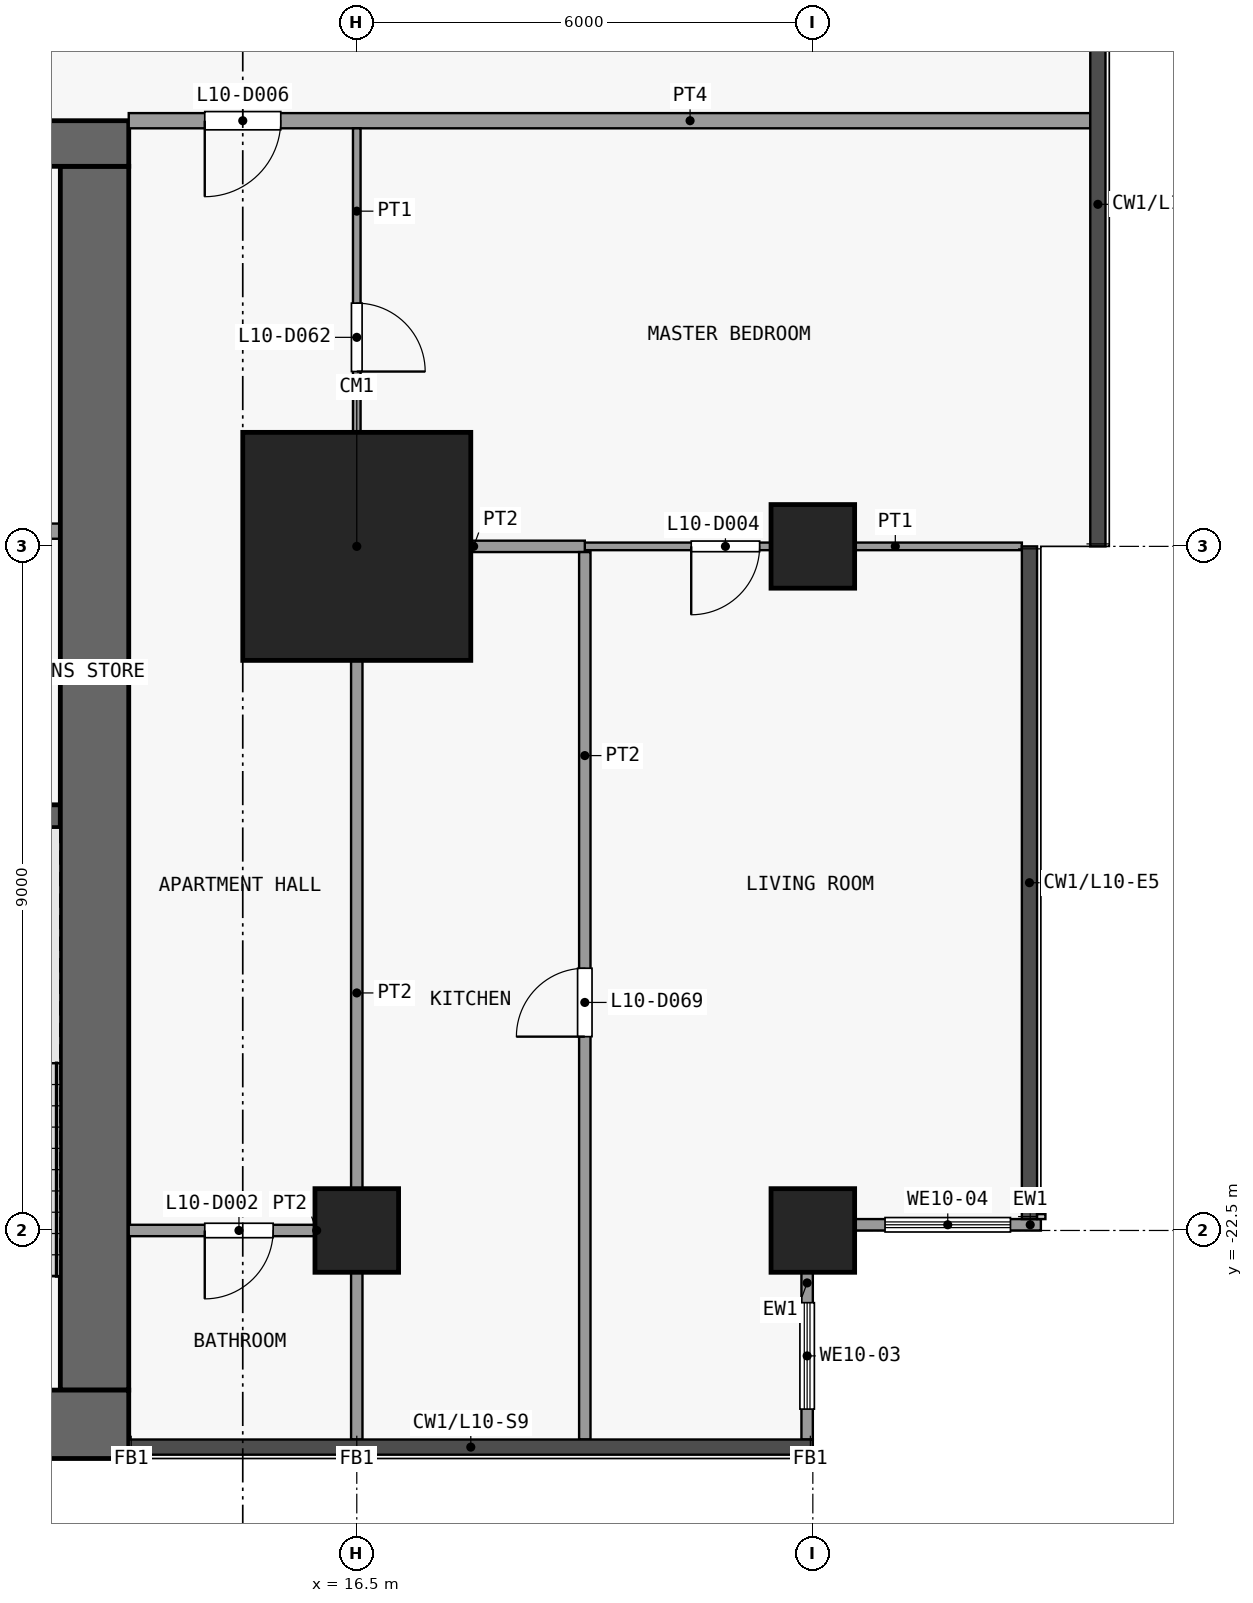
"""IFC4 building model, lengths in metres.
Left out: names, types, materials, properties, quantities, classifications, styles, units other than length and angle.
Written with IfcOpenShell. Run it as: python <this file> out.ifc"""

import sys

from ifc_helpers import new_model, si_unit, direction, frame, frame_2d, origin, origin_2d, place, context, subcontext, project, spatial, rectangle, extrude, element, fill, save


model = new_model("IFC4")
c1 = context("Model", 3, precision=1e-05, world=origin(), true_north=direction((0.0, 1.0)))
c2 = subcontext(c1, "Body", "Model", "MODEL_VIEW")
j1 = project(units=[si_unit("LENGTHUNIT", "METRE"), si_unit("PLANEANGLEUNIT", "RADIAN")], contexts=[c1])
p1 = place(None, origin())
s1 = spatial("IfcSite", under=j1, at=p1, CompositionType="ELEMENT")
p2 = place(p1, origin())
s2 = spatial("IfcBuilding", under=s1, at=p2, CompositionType="ELEMENT")
p3 = place(p2, frame((0.0, 0.0, 46.9)))
s3 = spatial("IfcBuildingStorey", under=s2, at=p3, CompositionType="ELEMENT", Elevation=46.9)
p4 = place(p3, frame((16.5, -22.5, 0.0), z_axis=(0.0, 0.0, 1.0), x_axis=(1.0, 0.0, 0.0)))
e1 = element("IfcColumn", 1, at=p4, inside=s3, PredefinedType="COLUMN", context=c2, shape_type="SweptSolid", body=[
    extrude(rectangle(XDim=1.1, YDim=1.1, at=origin_2d()), origin(), (0.0, 0.0, 1.0), 3.6),
])
p5 = place(p3, frame((16.5, -13.5, 0.0), z_axis=(0.0, 0.0, 1.0), x_axis=(1.0, 0.0, 0.0)))
e2 = element("IfcColumn", 2, at=p5, inside=s3, PredefinedType="COLUMN", context=c2, shape_type="SweptSolid", body=[
    extrude(rectangle(XDim=3.0, YDim=3.0, at=origin_2d()), origin(), (0.0, 0.0, 1.0), 3.6),
])
for number, where, z_axis, x_axis in (
    (3, (22.5, -22.5, 0.0), (0.0, 0.0, 1.0), (1.0, 0.0, 0.0)),
    (4, (22.5, -13.5, 0.0), (0.0, 0.0, 1.0), (1.0, 0.0, 0.0)),
):
    element("IfcColumn", number, at=place(p3, frame(where, z_axis=z_axis, x_axis=x_axis)), inside=s3, PredefinedType="COLUMN", context=c2, shape_type="SweptSolid", body=[
        extrude(rectangle(XDim=1.1, YDim=1.1, at=origin_2d()), origin(), (0.0, 0.0, 1.0), 3.6),
    ])
p6 = place(p3, frame((-13.5, -25.05, 0.0), z_axis=(0.0, 0.0, 1.0), x_axis=(1.0, 0.0, 0.0)))
e5 = element("IfcWall", 5, at=p6, inside=s3, PredefinedType="SHEAR", context=c2, shape_type="SweptSolid", body=[
    extrude(rectangle(XDim=27.0, YDim=0.9, at=frame_2d((13.5, 0.0))), origin(), (0.0, 0.0, 1.0), 3.3),
])
p7 = place(p3, frame((-13.5, -8.2, 0.0), z_axis=(0.0, 0.0, 1.0), x_axis=(1.0, 0.0, 0.0)))
e6 = element("IfcWall", 6, at=p7, inside=s3, PredefinedType="SHEAR", context=c2, shape_type="SweptSolid", body=[
    extrude(rectangle(XDim=27.0, YDim=0.6, at=frame_2d((13.5, 0.0))), origin(), (0.0, 0.0, 1.0), 3.3),
])
p8 = place(p7, frame((7.8, 0.0, 0.0)))
e7 = element("IfcOpeningElement", 7, at=p8, cuts=e6, PredefinedType="OPENING", context=c2, shape_type="SweptSolid", body=[
    extrude(rectangle(XDim=1.8, YDim=2.1, at=frame_2d((0.9, 1.05))), frame((0.0, 0.31, 0.0), z_axis=(0.0, -1.0, 0.0), x_axis=(1.0, 0.0, 0.0)), (0.0, 0.0, 1.0), 0.62),
])
p9 = place(p7, frame((17.4, 0.0, 0.0)))
e8 = element("IfcOpeningElement", 8, at=p9, cuts=e6, PredefinedType="OPENING", context=c2, shape_type="SweptSolid", body=[
    extrude(rectangle(XDim=1.8, YDim=2.1, at=frame_2d((0.9, 1.05))), frame((0.0, 0.31, 0.0), z_axis=(0.0, -1.0, 0.0), x_axis=(1.0, 0.0, 0.0)), (0.0, 0.0, 1.0), 0.62),
])
p10 = place(p7, frame((2.725, 0.0, 0.0)))
e9 = element("IfcOpeningElement", 9, at=p10, cuts=e6, PredefinedType="OPENING", context=c2, shape_type="SweptSolid", body=[
    extrude(rectangle(XDim=0.9, YDim=2.1, at=frame_2d((0.45, 1.05))), frame((0.0, 0.31, 0.0), z_axis=(0.0, -1.0, 0.0), x_axis=(1.0, 0.0, 0.0)), (0.0, 0.0, 1.0), 0.62),
])
p11 = place(p7, frame((23.375, 0.0, 0.0)))
e10 = element("IfcOpeningElement", 10, at=p11, cuts=e6, PredefinedType="OPENING", context=c2, shape_type="SweptSolid", body=[
    extrude(rectangle(XDim=0.9, YDim=2.1, at=frame_2d((0.45, 1.05))), frame((0.0, 0.31, 0.0), z_axis=(0.0, -1.0, 0.0), x_axis=(1.0, 0.0, 0.0)), (0.0, 0.0, 1.0), 0.62),
])
p12 = place(p3, frame((13.05, -24.6, 0.0), z_axis=(0.0, 0.0, 1.0), x_axis=(0.0, 1.0, 0.0)))
e11 = element("IfcWall", 11, at=p12, inside=s3, PredefinedType="SHEAR", context=c2, shape_type="SweptSolid", body=[
    extrude(rectangle(XDim=16.1, YDim=0.9, at=frame_2d((8.05, 0.0))), origin(), (0.0, 0.0, 1.0), 3.3),
])
p13 = place(p3, frame((9.5, -17.05, 0.0), z_axis=(0.0, 0.0, 1.0), x_axis=(1.0, 0.0, 0.0)))
e12 = element("IfcWall", 12, at=p13, inside=s3, PredefinedType="SHEAR", context=c2, shape_type="SweptSolid", body=[
    extrude(rectangle(XDim=3.1, YDim=0.3, at=frame_2d((1.55, 0.0))), origin(), (0.0, 0.0, 1.0), 3.3),
])
p14 = place(p3, frame((11.15, -13.3, 0.0), z_axis=(0.0, 0.0, 1.0), x_axis=(1.0, 0.0, 0.0)))
e13 = element("IfcWall", 13, at=p14, inside=s3, PredefinedType="PARTITIONING", context=c2, shape_type="SweptSolid", body=[
    extrude(rectangle(XDim=1.45, YDim=0.2, at=frame_2d((0.725, 0.0))), origin(), (0.0, 0.0, 1.0), 3.3),
])
p15 = place(p3, frame((22.425, -23.05, 0.0), z_axis=(0.0, 0.0, 1.0), x_axis=(0.0, -1.0, 0.0)))
e14 = element("IfcWall", 14, at=p15, inside=s3, PredefinedType="SOLIDWALL", context=c2, shape_type="SweptSolid", body=[
    extrude(rectangle(XDim=2.2, YDim=0.15, at=frame_2d((1.1, 0.0))), origin(), (0.0, 0.0, 1.0), 3.3),
])
p16 = place(p15, frame((0.4, 0.0, 0.9)))
e15 = element("IfcOpeningElement", 15, at=p16, cuts=e14, PredefinedType="OPENING", context=c2, shape_type="SweptSolid", body=[
    extrude(rectangle(XDim=1.4, YDim=2.4, at=frame_2d((0.7, 1.2))), frame((0.0, 0.085, 0.0), z_axis=(0.0, -1.0, 0.0), x_axis=(1.0, 0.0, 0.0)), (0.0, 0.0, 1.0), 0.17),
])
p17 = place(p3, frame((25.5, -22.425, 0.0), z_axis=(0.0, 0.0, 1.0), x_axis=(-1.0, 0.0, 0.0)))
e16 = element("IfcWall", 16, at=p17, inside=s3, PredefinedType="SOLIDWALL", context=c2, shape_type="SweptSolid", body=[
    extrude(rectangle(XDim=2.45, YDim=0.15, at=frame_2d((1.225, 0.0))), origin(), (0.0, 0.0, 1.0), 3.3),
])
p18 = place(p17, frame((0.4, 0.0, 0.9)))
e17 = element("IfcOpeningElement", 17, at=p18, cuts=e16, PredefinedType="OPENING", context=c2, shape_type="SweptSolid", body=[
    extrude(rectangle(XDim=1.65, YDim=2.4, at=frame_2d((0.825, 1.2))), frame((0.0, 0.085, 0.0), z_axis=(0.0, -1.0, 0.0), x_axis=(1.0, 0.0, 0.0)), (0.0, 0.0, 1.0), 0.17),
])
p19 = place(p3, frame((13.5, -22.5, 0.0), z_axis=(0.0, 0.0, 1.0), x_axis=(1.0, 0.0, 0.0)))
e18 = element("IfcWall", 18, at=p19, inside=s3, PredefinedType="PARTITIONING", context=c2, shape_type="SweptSolid", body=[
    extrude(rectangle(XDim=2.925, YDim=0.15, at=frame_2d((1.462, 0.0))), origin(), (0.0, 0.0, 1.0), 3.3),
])
p20 = place(p19, frame((1.0, 0.0, 0.0)))
e19 = element("IfcOpeningElement", 19, at=p20, cuts=e18, PredefinedType="OPENING", context=c2, shape_type="SweptSolid", body=[
    extrude(rectangle(XDim=0.9, YDim=2.1, at=frame_2d((0.45, 1.05))), frame((0.0, 0.085, 0.0), z_axis=(0.0, -1.0, 0.0), x_axis=(1.0, 0.0, 0.0)), (0.0, 0.0, 1.0), 0.17),
])
p21 = place(p3, frame((19.5, -13.5, 0.0), z_axis=(0.0, 0.0, 1.0), x_axis=(1.0, 0.0, 0.0)))
e20 = element("IfcWall", 20, at=p21, inside=s3, PredefinedType="PARTITIONING", context=c2, shape_type="SweptSolid", body=[
    extrude(rectangle(XDim=5.75, YDim=0.1, at=frame_2d((2.875, 0.0))), origin(), (0.0, 0.0, 1.0), 3.3),
])
p22 = place(p21, frame((1.4, 0.0, 0.0)))
e21 = element("IfcOpeningElement", 21, at=p22, cuts=e20, PredefinedType="OPENING", context=c2, shape_type="SweptSolid", body=[
    extrude(rectangle(XDim=0.9, YDim=2.1, at=frame_2d((0.45, 1.05))), frame((0.0, 0.06, 0.0), z_axis=(0.0, -1.0, 0.0), x_axis=(1.0, 0.0, 0.0)), (0.0, 0.0, 1.0), 0.12),
])
p23 = place(p3, frame((16.575, -13.5, 0.0), z_axis=(0.0, 0.0, 1.0), x_axis=(1.0, 0.0, 0.0)))
e22 = element("IfcWall", 22, at=p23, inside=s3, PredefinedType="PARTITIONING", context=c2, shape_type="SweptSolid", body=[
    extrude(rectangle(XDim=2.925, YDim=0.15, at=frame_2d((1.462, 0.0))), origin(), (0.0, 0.0, 1.0), 3.3),
])
p24 = place(p3, frame((13.5, -7.9, 0.0), z_axis=(0.0, 0.0, 1.0), x_axis=(1.0, 0.0, 0.0)))
e23 = element("IfcWall", 23, at=p24, inside=s3, PredefinedType="PARTITIONING", context=c2, shape_type="SweptSolid", body=[
    extrude(rectangle(XDim=12.65, YDim=0.2, at=frame_2d((6.325, 0.0))), origin(), (0.0, 0.0, 1.0), 3.3),
])
p25 = place(p24, frame((1.0, 0.0, 0.0)))
e24 = element("IfcOpeningElement", 24, at=p25, cuts=e23, PredefinedType="OPENING", context=c2, shape_type="SweptSolid", body=[
    extrude(rectangle(XDim=1.0, YDim=2.1, at=frame_2d((0.5, 1.05))), frame((0.0, 0.11, 0.0), z_axis=(0.0, -1.0, 0.0), x_axis=(1.0, 0.0, 0.0)), (0.0, 0.0, 1.0), 0.22),
])
p26 = place(p3, frame((16.5, -13.5, 0.0), z_axis=(0.0, 0.0, 1.0), x_axis=(0.0, 1.0, 0.0)))
e25 = element("IfcWall", 25, at=p26, inside=s3, PredefinedType="PARTITIONING", context=c2, shape_type="SweptSolid", body=[
    extrude(rectangle(XDim=5.5, YDim=0.1, at=frame_2d((2.75, 0.0))), origin(), (0.0, 0.0, 1.0), 3.3),
])
p27 = place(p26, frame((2.3, 0.0, 0.0)))
e26 = element("IfcOpeningElement", 26, at=p27, cuts=e25, PredefinedType="OPENING", context=c2, shape_type="SweptSolid", body=[
    extrude(rectangle(XDim=0.9, YDim=2.1, at=frame_2d((0.45, 1.05))), frame((0.0, 0.06, 0.0), z_axis=(0.0, -1.0, 0.0), x_axis=(1.0, 0.0, 0.0)), (0.0, 0.0, 1.0), 0.12),
])
p28 = place(p3, frame((16.5, -25.25, 0.0), z_axis=(0.0, 0.0, 1.0), x_axis=(0.0, 1.0, 0.0)))
e27 = element("IfcWall", 27, at=p28, inside=s3, PredefinedType="PARTITIONING", context=c2, shape_type="SweptSolid", body=[
    extrude(rectangle(XDim=11.75, YDim=0.15, at=frame_2d((5.875, 0.0))), origin(), (0.0, 0.0, 1.0), 3.3),
])
p29 = place(p3, frame((19.5, -25.25, 0.0), z_axis=(0.0, 0.0, 1.0), x_axis=(0.0, 1.0, 0.0)))
e28 = element("IfcWall", 28, at=p29, inside=s3, PredefinedType="PARTITIONING", context=c2, shape_type="SweptSolid", body=[
    extrude(rectangle(XDim=11.675, YDim=0.15, at=frame_2d((5.837, 0.0))), origin(), (0.0, 0.0, 1.0), 3.3),
])
p30 = place(p29, frame((5.3, 0.0, 0.0)))
e29 = element("IfcOpeningElement", 29, at=p30, cuts=e28, PredefinedType="OPENING", context=c2, shape_type="SweptSolid", body=[
    extrude(rectangle(XDim=0.9, YDim=2.1, at=frame_2d((0.45, 1.05))), frame((0.0, 0.085, 0.0), z_axis=(0.0, -1.0, 0.0), x_axis=(1.0, 0.0, 0.0)), (0.0, 0.0, 1.0), 0.17),
])
p31 = place(p16, origin())
e30 = element("IfcWindow", 30, at=p31, inside=s3, PartitioningType="SINGLE_PANEL", PredefinedType="WINDOW", context=c2, shape_type="SweptSolid", body=[
    extrude(rectangle(XDim=1.4, YDim=2.4, at=frame_2d((0.7, 1.2))), frame((0.0, 0.03, 0.0), z_axis=(0.0, -1.0, 0.0), x_axis=(1.0, 0.0, 0.0)), (0.0, 0.0, 1.0), 0.06),
])
fill(e15, e30)
p32 = place(p18, origin())
e31 = element("IfcWindow", 31, at=p32, inside=s3, PartitioningType="SINGLE_PANEL", PredefinedType="WINDOW", context=c2, shape_type="SweptSolid", body=[
    extrude(rectangle(XDim=1.65, YDim=2.4, at=frame_2d((0.825, 1.2))), frame((0.0, 0.03, 0.0), z_axis=(0.0, -1.0, 0.0), x_axis=(1.0, 0.0, 0.0)), (0.0, 0.0, 1.0), 0.06),
])
fill(e17, e31)
p33 = place(p20, origin())
e32 = element("IfcDoor", 32, at=p33, inside=s3, OperationType="SINGLE_SWING_LEFT", PredefinedType="DOOR", context=c2, shape_type="SweptSolid", body=[
    extrude(rectangle(XDim=0.9, YDim=2.1, at=frame_2d((0.45, 1.05))), frame((0.0, 0.025, 0.0), z_axis=(0.0, -1.0, 0.0), x_axis=(1.0, 0.0, 0.0)), (0.0, 0.0, 1.0), 0.05),
])
fill(e19, e32)
p34 = place(p22, origin())
e33 = element("IfcDoor", 33, at=p34, inside=s3, OperationType="SINGLE_SWING_LEFT", PredefinedType="DOOR", context=c2, shape_type="SweptSolid", body=[
    extrude(rectangle(XDim=0.9, YDim=2.1, at=frame_2d((0.45, 1.05))), frame((0.0, 0.025, 0.0), z_axis=(0.0, -1.0, 0.0), x_axis=(1.0, 0.0, 0.0)), (0.0, 0.0, 1.0), 0.05),
])
fill(e21, e33)
p35 = place(p25, origin())
e34 = element("IfcDoor", 34, at=p35, inside=s3, OperationType="SINGLE_SWING_LEFT", PredefinedType="DOOR", context=c2, shape_type="SweptSolid", body=[
    extrude(rectangle(XDim=1.0, YDim=2.1, at=frame_2d((0.5, 1.05))), frame((0.0, 0.025, 0.0), z_axis=(0.0, -1.0, 0.0), x_axis=(1.0, 0.0, 0.0)), (0.0, 0.0, 1.0), 0.05),
])
fill(e24, e34)
p36 = place(p27, origin())
e35 = element("IfcDoor", 35, at=p36, inside=s3, OperationType="SINGLE_SWING_LEFT", PredefinedType="DOOR", context=c2, shape_type="SweptSolid", body=[
    extrude(rectangle(XDim=0.9, YDim=2.1, at=frame_2d((0.45, 1.05))), frame((0.0, 0.025, 0.0), z_axis=(0.0, -1.0, 0.0), x_axis=(1.0, 0.0, 0.0)), (0.0, 0.0, 1.0), 0.05),
])
fill(e26, e35)
p37 = place(p30, origin())
e36 = element("IfcDoor", 36, at=p37, inside=s3, OperationType="SINGLE_SWING_RIGHT", PredefinedType="DOOR", context=c2, shape_type="SweptSolid", body=[
    extrude(rectangle(XDim=0.9, YDim=2.1, at=frame_2d((0.45, 1.05))), frame((0.0, 0.025, 0.0), z_axis=(0.0, -1.0, 0.0), x_axis=(1.0, 0.0, 0.0)), (0.0, 0.0, 1.0), 0.05),
])
fill(e29, e36)
save(model, sys.argv[1])
